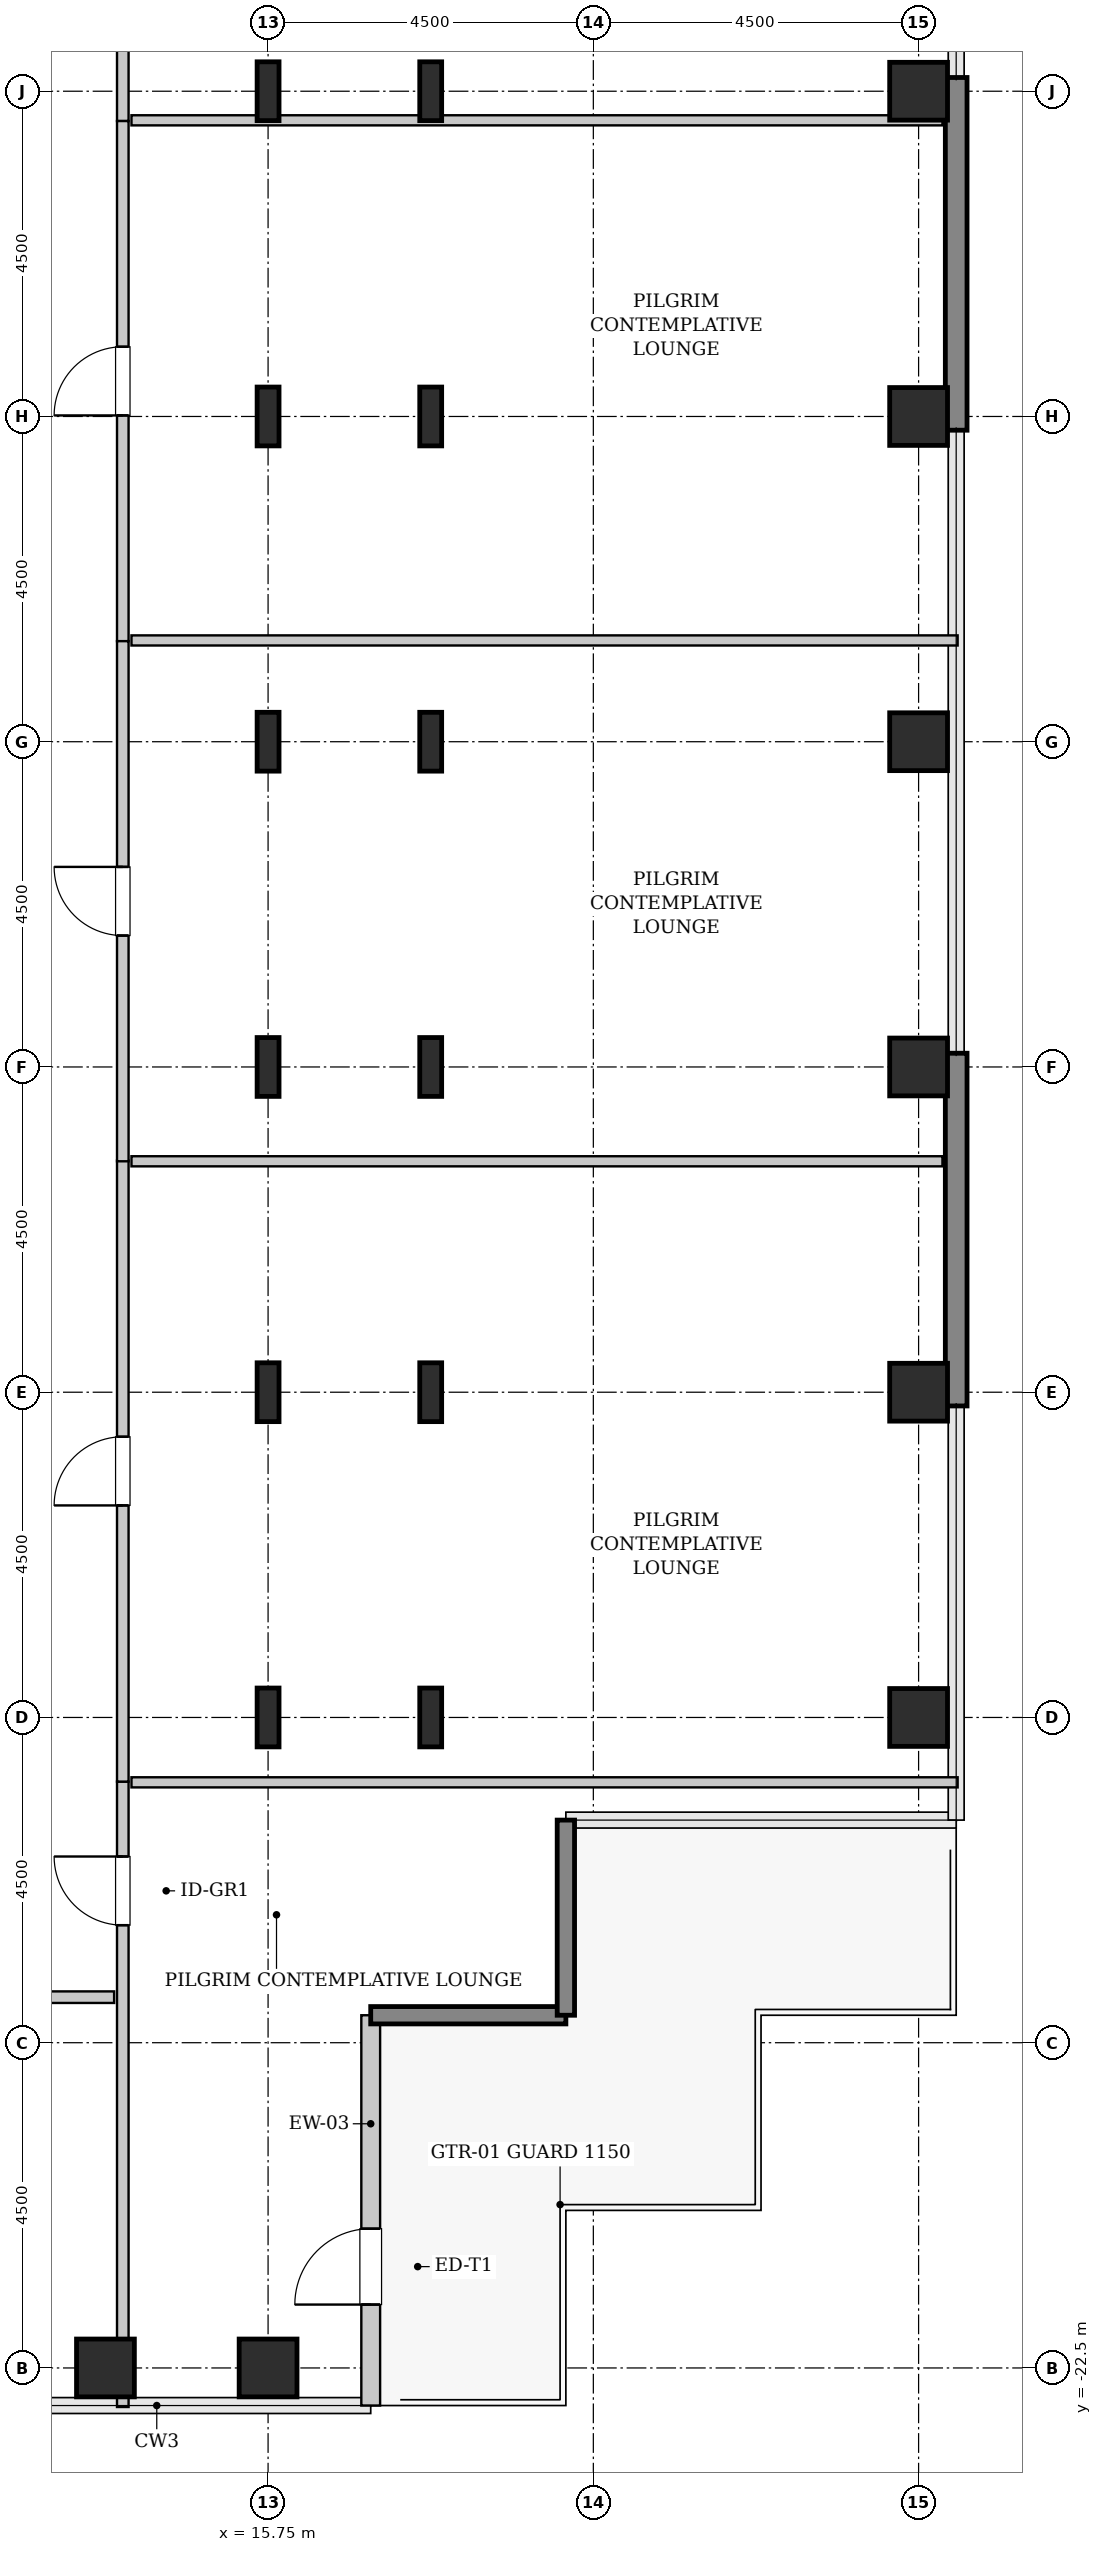
"""IFC4 building model, lengths in metres.
Left out: names, types, materials, properties, quantities, classifications, styles, units other than length and angle.
Written with IfcOpenShell. Run it as: python <this file> out.ifc"""

import sys

from ifc_helpers import new_model, si_unit, direction, frame, frame_2d, origin, origin_2d, place, context, subcontext, project, spatial, rectangle, hollow_rectangle, i_section, extrude, source, transform, mapped, element, fill, save


model = new_model("IFC4")
c1 = context("Model", 3, precision=1e-05, world=origin(), true_north=direction((0.0, 1.0)))
c2 = subcontext(c1, "Body", "Model", "MODEL_VIEW")
j1 = project(units=[si_unit("LENGTHUNIT", "METRE"), si_unit("PLANEANGLEUNIT", "RADIAN")], contexts=[c1])
p1 = place(None, origin())
s1 = spatial("IfcSite", under=j1, at=p1, CompositionType="ELEMENT")
p2 = place(p1, origin())
s2 = spatial("IfcBuilding", under=s1, at=p2, CompositionType="ELEMENT")
p3 = place(p2, frame((0.0, 0.0, 183.0)))
s3 = spatial("IfcBuildingStorey", under=s2, at=p3, CompositionType="ELEMENT", Elevation=183.0)
m1 = source(origin(), c2, "Body", "SweptSolid", [
    extrude(hollow_rectangle(XDim=0.8, YDim=0.8, WallThickness=0.04, InnerFilletRadius=0.04, OuterFilletRadius=0.08, at=origin_2d()), origin(), (0.0, 0.0, 1.0), 3.8),
])
for number, where, z_axis, x_axis in (
    (1, (13.5, -22.5, 0.0), (0.0, 0.0, 1.0), (1.0, 0.0, 0.0)),
    (2, (15.75, -22.5, 0.0), (0.0, 0.0, 1.0), (1.0, 0.0, 0.0)),
):
    element("IfcColumn", number, at=place(p3, frame(where, z_axis=z_axis, x_axis=x_axis)), inside=s3, PredefinedType="COLUMN", context=c2, shape_type="MappedRepresentation", body=[
        mapped(m1, transform((0.0, 0.0, 0.0), x_axis=(1.0, 0.0, 0.0), y_axis=(0.0, 1.0, 0.0), z_axis=(0.0, 0.0, 1.0), scale=1.0)),
    ])
m2 = source(origin(), c2, "Body", "SweptSolid", [
    extrude(i_section(OverallWidth=0.303, OverallDepth=0.814, WebThickness=0.021, FlangeThickness=0.04, FilletRadius=0.03, at=origin_2d()), origin(), (0.0, 0.0, 1.0), 3.8),
])
for number, where, z_axis, x_axis in (
    (3, (15.75, -13.5, 0.0), (0.0, 0.0, 1.0), (1.0, 0.0, 0.0)),
    (4, (15.75, -9.0, 0.0), (0.0, 0.0, 1.0), (1.0, 0.0, 0.0)),
    (5, (15.75, -4.5, 0.0), (0.0, 0.0, 1.0), (1.0, 0.0, 0.0)),
    (6, (15.75, 0.0, 0.0), (0.0, 0.0, 1.0), (1.0, 0.0, 0.0)),
    (7, (15.75, 4.5, 0.0), (0.0, 0.0, 1.0), (1.0, 0.0, 0.0)),
    (8, (15.75, 9.0, 0.0), (0.0, 0.0, 1.0), (1.0, 0.0, 0.0)),
    (9, (18.0, -13.5, 0.0), (0.0, 0.0, 1.0), (1.0, 0.0, 0.0)),
    (10, (18.0, -9.0, 0.0), (0.0, 0.0, 1.0), (1.0, 0.0, 0.0)),
    (11, (18.0, -4.5, 0.0), (0.0, 0.0, 1.0), (1.0, 0.0, 0.0)),
    (12, (18.0, 0.0, 0.0), (0.0, 0.0, 1.0), (1.0, 0.0, 0.0)),
    (13, (18.0, 4.5, 0.0), (0.0, 0.0, 1.0), (1.0, 0.0, 0.0)),
    (14, (18.0, 9.0, 0.0), (0.0, 0.0, 1.0), (1.0, 0.0, 0.0)),
):
    element("IfcColumn", number, at=place(p3, frame(where, z_axis=z_axis, x_axis=x_axis)), inside=s3, PredefinedType="COLUMN", context=c2, shape_type="MappedRepresentation", body=[
        mapped(m2, transform((0.0, 0.0, 0.0), x_axis=(1.0, 0.0, 0.0), y_axis=(0.0, 1.0, 0.0), z_axis=(0.0, 0.0, 1.0), scale=1.0)),
    ])
for number, where, z_axis, x_axis in (
    (15, (24.75, -13.5, 0.0), (0.0, 0.0, 1.0), (1.0, 0.0, 0.0)),
    (16, (24.75, -9.0, 0.0), (0.0, 0.0, 1.0), (1.0, 0.0, 0.0)),
    (17, (24.75, -4.5, 0.0), (0.0, 0.0, 1.0), (1.0, 0.0, 0.0)),
    (18, (24.75, 0.0, 0.0), (0.0, 0.0, 1.0), (1.0, 0.0, 0.0)),
    (19, (24.75, 4.5, 0.0), (0.0, 0.0, 1.0), (1.0, 0.0, 0.0)),
    (20, (24.75, 9.0, 0.0), (0.0, 0.0, 1.0), (1.0, 0.0, 0.0)),
):
    element("IfcColumn", number, at=place(p3, frame(where, z_axis=z_axis, x_axis=x_axis)), inside=s3, PredefinedType="COLUMN", context=c2, shape_type="MappedRepresentation", body=[
        mapped(m1, transform((0.0, 0.0, 0.0), x_axis=(1.0, 0.0, 0.0), y_axis=(0.0, 1.0, 0.0), z_axis=(0.0, 0.0, 1.0), scale=1.0)),
    ])
m3 = source(origin(), c2, "Body", "SweptSolid", [
    extrude(rectangle(XDim=4.88, YDim=0.3, at=frame_2d((2.44, 0.0))), origin(), (0.0, 0.0, 1.0), 3.55),
])
for number, where, z_axis, x_axis in (
    (21, (25.27, -9.19, 0.0), (0.0, 0.0, 1.0), (0.0, 1.0, 0.0)),
    (22, (25.27, 4.31, 0.0), (0.0, 0.0, 1.0), (0.0, 1.0, 0.0)),
):
    element("IfcWall", number, at=place(p3, frame(where, z_axis=z_axis, x_axis=x_axis)), inside=s3, PredefinedType="SHEAR", context=c2, shape_type="MappedRepresentation", body=[
        mapped(m3, transform((0.0, 0.0, 0.0), x_axis=(1.0, 0.0, 0.0), y_axis=(0.0, 1.0, 0.0), z_axis=(0.0, 0.0, 1.0), scale=1.0)),
    ])
m4 = source(origin(), c2, "Body", "SweptSolid", [
    extrude(rectangle(XDim=5.4, YDim=0.26, at=frame_2d((2.7, 0.0))), origin(), (0.0, 0.0, 1.0), 3.55),
])
p4 = place(p3, frame((17.17, -23.02, 0.0), z_axis=(0.0, 0.0, 1.0), x_axis=(0.0, 1.0, 0.0)))
e23 = element("IfcWall", 23, at=p4, inside=s3, PredefinedType="SOLIDWALL", context=c2, shape_type="MappedRepresentation", body=[
    mapped(m4, transform((0.0, 0.0, 0.0), x_axis=(1.0, 0.0, 0.0), y_axis=(0.0, 1.0, 0.0), z_axis=(0.0, 0.0, 1.0), scale=1.0)),
])
p5 = place(p4, frame((1.397, 0.0, 0.0)))
e24 = element("IfcOpeningElement", 24, at=p5, cuts=e23, PredefinedType="OPENING", context=c2, shape_type="SweptSolid", body=[
    extrude(rectangle(XDim=1.05, YDim=2.2, at=frame_2d((0.525, 1.1))), frame((0.0, 0.14, 0.0), z_axis=(0.0, -1.0, 0.0), x_axis=(1.0, 0.0, 0.0)), (0.0, 0.0, 1.0), 0.28),
])
m5 = source(origin(), c2, "Body", "SweptSolid", [
    extrude(rectangle(XDim=2.7, YDim=0.24, at=frame_2d((1.35, 0.0))), origin(), (0.0, 0.0, 1.0), 3.55),
])
for number, where, z_axis, x_axis in (
    (25, (17.17, -17.62, 0.0), (0.0, 0.0, 1.0), (1.0, 0.0, 0.0)),
    (26, (19.87, -17.62, 0.0), (0.0, 0.0, 1.0), (0.0, 1.0, 0.0)),
):
    element("IfcWall", number, at=place(p3, frame(where, z_axis=z_axis, x_axis=x_axis)), inside=s3, PredefinedType="SHEAR", context=c2, shape_type="MappedRepresentation", body=[
        mapped(m5, transform((0.0, 0.0, 0.0), x_axis=(1.0, 0.0, 0.0), y_axis=(0.0, 1.0, 0.0), z_axis=(0.0, 0.0, 1.0), scale=1.0)),
    ])
m6 = source(origin(), c2, "Body", "SweptSolid", [
    extrude(rectangle(XDim=8.653, YDim=0.16, at=frame_2d((4.326, 0.0))), origin(), (0.0, 0.0, 1.0), 3.535),
])
p6 = place(p3, frame((13.74, -23.04, 0.0), z_axis=(0.0, 0.0, 1.0), x_axis=(0.0, 1.0, 0.0)))
e27 = element("IfcWall", 27, at=p6, inside=s3, PredefinedType="PARTITIONING", context=c2, shape_type="MappedRepresentation", body=[
    mapped(m6, transform((0.0, 0.0, 0.0), x_axis=(1.0, 0.0, 0.0), y_axis=(0.0, 1.0, 0.0), z_axis=(0.0, 0.0, 1.0), scale=1.0)),
])
p7 = place(p6, frame((6.666, 0.0, 0.0)))
e28 = element("IfcOpeningElement", 28, at=p7, cuts=e27, PredefinedType="OPENING", context=c2, shape_type="SweptSolid", body=[
    extrude(rectangle(XDim=0.95, YDim=2.1, at=frame_2d((0.475, 1.05))), frame((0.0, 0.09, 0.0), z_axis=(0.0, -1.0, 0.0), x_axis=(1.0, 0.0, 0.0)), (0.0, 0.0, 1.0), 0.18),
])
m7 = source(origin(), c2, "Body", "SweptSolid", [
    extrude(rectangle(XDim=11.43, YDim=0.14, at=frame_2d((5.715, 0.0))), origin(), (0.0, 0.0, 1.0), 3.535),
])
p8 = place(p3, frame((13.86, -14.397, 0.0), z_axis=(0.0, 0.0, 1.0), x_axis=(1.0, 0.0, 0.0)))
e29 = element("IfcWall", 29, at=p8, inside=s3, PredefinedType="PARTITIONING", context=c2, shape_type="MappedRepresentation", body=[
    mapped(m7, transform((0.0, 0.0, 0.0), x_axis=(1.0, 0.0, 0.0), y_axis=(0.0, 1.0, 0.0), z_axis=(0.0, 0.0, 1.0), scale=1.0)),
])
m8 = source(origin(), c2, "Body", "SweptSolid", [
    extrude(rectangle(XDim=8.593, YDim=0.16, at=frame_2d((4.296, 0.0))), origin(), (0.0, 0.0, 1.0), 3.535),
])
p9 = place(p3, frame((13.74, -14.387, 0.0), z_axis=(0.0, 0.0, 1.0), x_axis=(0.0, 1.0, 0.0)))
e30 = element("IfcWall", 30, at=p9, inside=s3, PredefinedType="PARTITIONING", context=c2, shape_type="MappedRepresentation", body=[
    mapped(m8, transform((0.0, 0.0, 0.0), x_axis=(1.0, 0.0, 0.0), y_axis=(0.0, 1.0, 0.0), z_axis=(0.0, 0.0, 1.0), scale=1.0)),
])
p10 = place(p9, frame((3.821, 0.0, 0.0)))
e31 = element("IfcOpeningElement", 31, at=p10, cuts=e30, PredefinedType="OPENING", context=c2, shape_type="SweptSolid", body=[
    extrude(rectangle(XDim=0.95, YDim=2.1, at=frame_2d((0.475, 1.05))), frame((0.0, 0.09, 0.0), z_axis=(0.0, -1.0, 0.0), x_axis=(1.0, 0.0, 0.0)), (0.0, 0.0, 1.0), 0.18),
])
m9 = source(origin(), c2, "Body", "SweptSolid", [
    extrude(rectangle(XDim=11.22, YDim=0.14, at=frame_2d((5.61, 0.0))), origin(), (0.0, 0.0, 1.0), 3.535),
])
p11 = place(p3, frame((13.86, -5.805, 0.0), z_axis=(0.0, 0.0, 1.0), x_axis=(1.0, 0.0, 0.0)))
e32 = element("IfcWall", 32, at=p11, inside=s3, PredefinedType="PARTITIONING", context=c2, shape_type="MappedRepresentation", body=[
    mapped(m9, transform((0.0, 0.0, 0.0), x_axis=(1.0, 0.0, 0.0), y_axis=(0.0, 1.0, 0.0), z_axis=(0.0, 0.0, 1.0), scale=1.0)),
])
m10 = source(origin(), c2, "Body", "SweptSolid", [
    extrude(rectangle(XDim=14.453, YDim=0.16, at=frame_2d((7.226, 0.0))), origin(), (0.0, 0.0, 1.0), 3.535),
])
p12 = place(p3, frame((13.74, 8.587, 0.0), z_axis=(0.0, 0.0, 1.0), x_axis=(0.0, 1.0, 0.0)))
e33 = element("IfcWall", 33, at=p12, inside=s3, PredefinedType="PARTITIONING", context=c2, shape_type="MappedRepresentation", body=[
    mapped(m10, transform((0.0, 0.0, 0.0), x_axis=(1.0, 0.0, 0.0), y_axis=(0.0, 1.0, 0.0), z_axis=(0.0, 0.0, 1.0), scale=1.0)),
])
p13 = place(p12, frame((3.936, 0.0, 0.0)))
e34 = element("IfcOpeningElement", 34, at=p13, cuts=e33, PredefinedType="OPENING", context=c2, shape_type="SweptSolid", body=[
    extrude(rectangle(XDim=0.95, YDim=2.1, at=frame_2d((0.475, 1.05))), frame((0.0, 0.09, 0.0), z_axis=(0.0, -1.0, 0.0), x_axis=(1.0, 0.0, 0.0)), (0.0, 0.0, 1.0), 0.18),
])
m11 = source(origin(), c2, "Body", "SweptSolid", [
    extrude(rectangle(XDim=11.22, YDim=0.14, at=frame_2d((5.61, 0.0))), origin(), (0.0, 0.0, 1.0), 2.875),
])
p14 = place(p3, frame((13.86, 8.597, 0.0), z_axis=(0.0, 0.0, 1.0), x_axis=(1.0, 0.0, 0.0)))
e35 = element("IfcWall", 35, at=p14, inside=s3, PredefinedType="PARTITIONING", context=c2, shape_type="MappedRepresentation", body=[
    mapped(m11, transform((0.0, 0.0, 0.0), x_axis=(1.0, 0.0, 0.0), y_axis=(0.0, 1.0, 0.0), z_axis=(0.0, 0.0, 1.0), scale=1.0)),
])
m12 = source(origin(), c2, "Body", "SweptSolid", [
    extrude(rectangle(XDim=7.196, YDim=0.16, at=frame_2d((3.598, 0.0))), origin(), (0.0, 0.0, 1.0), 3.535),
])
p15 = place(p3, frame((13.74, 1.391, 0.0), z_axis=(0.0, 0.0, 1.0), x_axis=(0.0, 1.0, 0.0)))
e36 = element("IfcWall", 36, at=p15, inside=s3, PredefinedType="PARTITIONING", context=c2, shape_type="MappedRepresentation", body=[
    mapped(m12, transform((0.0, 0.0, 0.0), x_axis=(1.0, 0.0, 0.0), y_axis=(0.0, 1.0, 0.0), z_axis=(0.0, 0.0, 1.0), scale=1.0)),
])
p16 = place(p15, frame((3.123, 0.0, 0.0)))
e37 = element("IfcOpeningElement", 37, at=p16, cuts=e36, PredefinedType="OPENING", context=c2, shape_type="SweptSolid", body=[
    extrude(rectangle(XDim=0.95, YDim=2.1, at=frame_2d((0.475, 1.05))), frame((0.0, 0.09, 0.0), z_axis=(0.0, -1.0, 0.0), x_axis=(1.0, 0.0, 0.0)), (0.0, 0.0, 1.0), 0.18),
])
p17 = place(p3, frame((13.86, 1.401, 0.0), z_axis=(0.0, 0.0, 1.0), x_axis=(1.0, 0.0, 0.0)))
e38 = element("IfcWall", 38, at=p17, inside=s3, PredefinedType="PARTITIONING", context=c2, shape_type="MappedRepresentation", body=[
    mapped(m7, transform((0.0, 0.0, 0.0), x_axis=(1.0, 0.0, 0.0), y_axis=(0.0, 1.0, 0.0), z_axis=(0.0, 0.0, 1.0), scale=1.0)),
])
m13 = source(origin(), c2, "Body", "SweptSolid", [
    extrude(rectangle(XDim=7.196, YDim=0.16, at=frame_2d((3.598, 0.0))), origin(), (0.0, 0.0, 1.0), 3.535),
])
p18 = place(p3, frame((13.74, -5.805, 0.0), z_axis=(0.0, 0.0, 1.0), x_axis=(0.0, 1.0, 0.0)))
e39 = element("IfcWall", 39, at=p18, inside=s3, PredefinedType="PARTITIONING", context=c2, shape_type="MappedRepresentation", body=[
    mapped(m13, transform((0.0, 0.0, 0.0), x_axis=(1.0, 0.0, 0.0), y_axis=(0.0, 1.0, 0.0), z_axis=(0.0, 0.0, 1.0), scale=1.0)),
])
p19 = place(p18, frame((3.123, 0.0, 0.0)))
e40 = element("IfcOpeningElement", 40, at=p19, cuts=e39, PredefinedType="OPENING", context=c2, shape_type="SweptSolid", body=[
    extrude(rectangle(XDim=0.95, YDim=2.1, at=frame_2d((0.475, 1.05))), frame((0.0, 0.09, 0.0), z_axis=(0.0, -1.0, 0.0), x_axis=(1.0, 0.0, 0.0)), (0.0, 0.0, 1.0), 0.18),
])
m14 = source(origin(), c2, "Body", "SweptSolid", [
    extrude(rectangle(XDim=7.225, YDim=0.16, at=frame_2d((3.613, 0.0))), origin(), (0.0, 0.0, 1.0), 3.535),
])
p20 = place(p3, frame((6.395, -17.37, 0.0), z_axis=(0.0, 0.0, 1.0), x_axis=(1.0, 0.0, 0.0)))
e41 = element("IfcWall", 41, at=p20, inside=s3, PredefinedType="PARTITIONING", context=c2, shape_type="MappedRepresentation", body=[
    mapped(m14, transform((0.0, 0.0, 0.0), x_axis=(1.0, 0.0, 0.0), y_axis=(0.0, 1.0, 0.0), z_axis=(0.0, 0.0, 1.0), scale=1.0)),
])
p21 = place(p20, frame((3.137, 0.0, 0.0)))
e42 = element("IfcOpeningElement", 42, at=p21, cuts=e41, PredefinedType="OPENING", context=c2, shape_type="SweptSolid", body=[
    extrude(rectangle(XDim=0.95, YDim=2.1, at=frame_2d((0.475, 1.05))), frame((0.0, 0.09, 0.0), z_axis=(0.0, -1.0, 0.0), x_axis=(1.0, 0.0, 0.0)), (0.0, 0.0, 1.0), 0.18),
])
m15 = source(origin(), c2, "Body", "SweptSolid", [
    extrude(rectangle(XDim=1.05, YDim=2.2, at=frame_2d((0.525, 1.1))), frame((0.0, 0.025, 0.0), z_axis=(0.0, -1.0, 0.0), x_axis=(1.0, 0.0, 0.0)), (0.0, 0.0, 1.0), 0.05),
])
p22 = place(p5, origin())
e43 = element("IfcDoor", 43, at=p22, inside=s3, OperationType="SINGLE_SWING_LEFT", PredefinedType="DOOR", context=c2, shape_type="MappedRepresentation", body=[
    mapped(m15, transform((0.0, 0.0, 0.0), x_axis=(1.0, 0.0, 0.0), y_axis=(0.0, 1.0, 0.0), z_axis=(0.0, 0.0, 1.0), scale=1.0)),
])
fill(e24, e43)
m16 = source(origin(), c2, "Body", "SweptSolid", [
    extrude(rectangle(XDim=0.95, YDim=2.1, at=frame_2d((0.475, 1.05))), frame((0.0, 0.025, 0.0), z_axis=(0.0, -1.0, 0.0), x_axis=(1.0, 0.0, 0.0)), (0.0, 0.0, 1.0), 0.05),
])
p23 = place(p7, origin())
e44 = element("IfcDoor", 44, at=p23, inside=s3, OperationType="SINGLE_SWING_RIGHT", PredefinedType="DOOR", context=c2, shape_type="MappedRepresentation", body=[
    mapped(m16, transform((0.0, 0.0, 0.0), x_axis=(1.0, 0.0, 0.0), y_axis=(0.0, 1.0, 0.0), z_axis=(0.0, 0.0, 1.0), scale=1.0)),
])
fill(e28, e44)
p24 = place(p10, origin())
e45 = element("IfcDoor", 45, at=p24, inside=s3, OperationType="SINGLE_SWING_LEFT", PredefinedType="DOOR", context=c2, shape_type="MappedRepresentation", body=[
    mapped(m16, transform((0.0, 0.0, 0.0), x_axis=(1.0, 0.0, 0.0), y_axis=(0.0, 1.0, 0.0), z_axis=(0.0, 0.0, 1.0), scale=1.0)),
])
fill(e31, e45)
p25 = place(p16, origin())
e46 = element("IfcDoor", 46, at=p25, inside=s3, OperationType="SINGLE_SWING_LEFT", PredefinedType="DOOR", context=c2, shape_type="MappedRepresentation", body=[
    mapped(m16, transform((0.0, 0.0, 0.0), x_axis=(1.0, 0.0, 0.0), y_axis=(0.0, 1.0, 0.0), z_axis=(0.0, 0.0, 1.0), scale=1.0)),
])
fill(e37, e46)
p26 = place(p19, origin())
e47 = element("IfcDoor", 47, at=p26, inside=s3, OperationType="SINGLE_SWING_RIGHT", PredefinedType="DOOR", context=c2, shape_type="MappedRepresentation", body=[
    mapped(m16, transform((0.0, 0.0, 0.0), x_axis=(1.0, 0.0, 0.0), y_axis=(0.0, 1.0, 0.0), z_axis=(0.0, 0.0, 1.0), scale=1.0)),
])
fill(e40, e47)
save(model, sys.argv[1])
